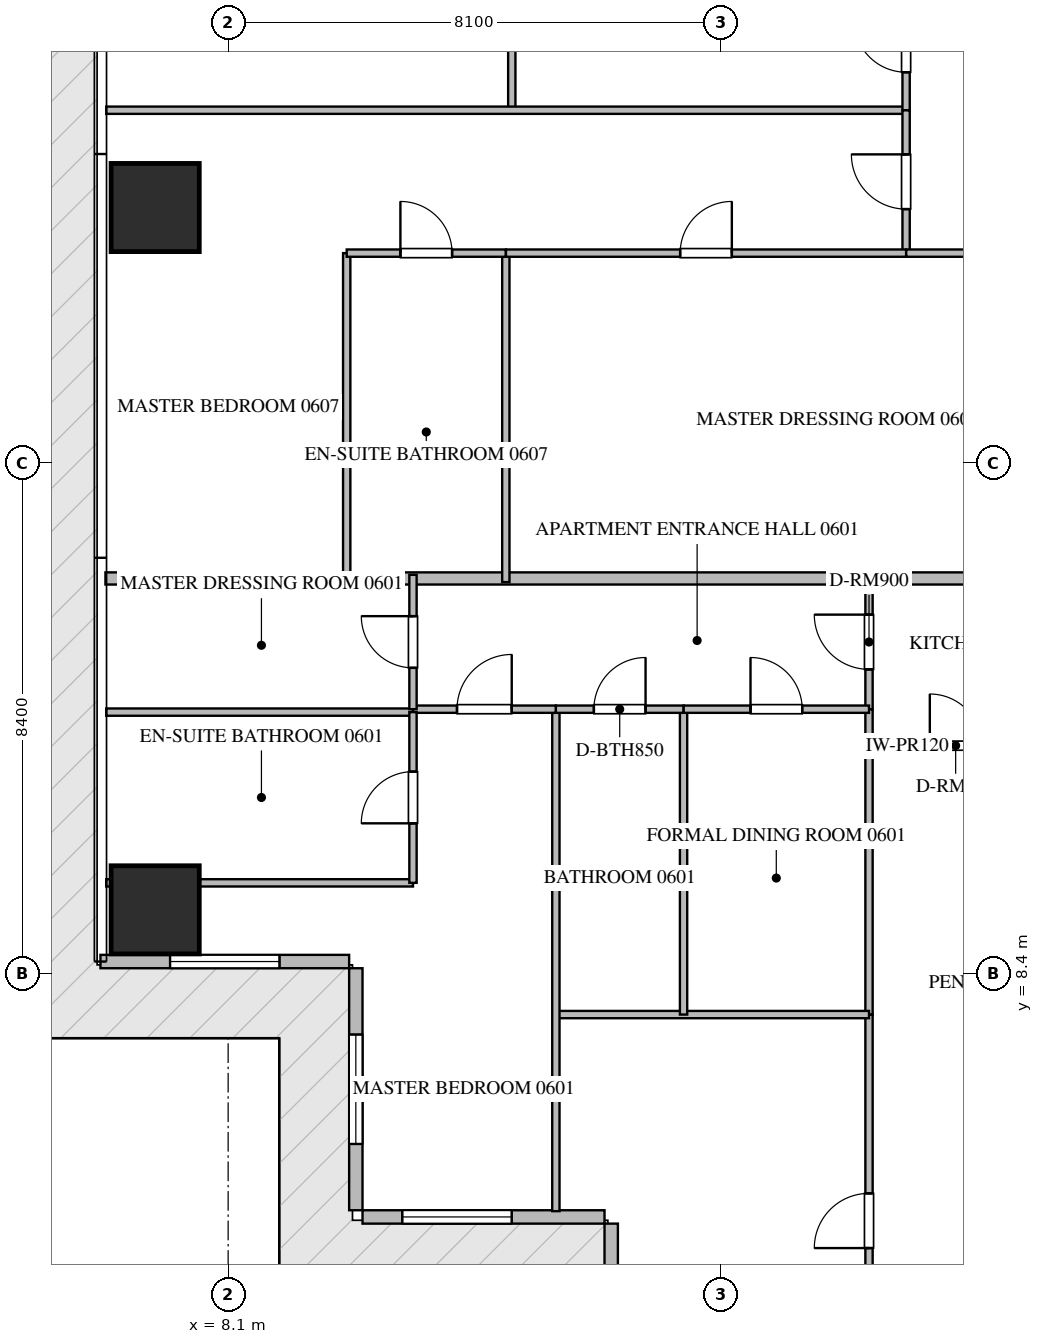
"""IFC4 building model, lengths in metres.
Left out: names, types, materials, properties, quantities, classifications, styles, units other than length and angle.
Written with IfcOpenShell. Run it as: python <this file> out.ifc"""

import sys

from ifc_helpers import new_model, si_unit, direction, frame, frame_2d, origin, origin_2d, place, context, subcontext, project, spatial, rectangle, extrude, source, transform, mapped, element, fill, save


model = new_model("IFC4")
c1 = context("Model", 3, precision=1e-05, world=origin(), true_north=direction((0.0, 1.0)))
c2 = subcontext(c1, "Body", "Model", "MODEL_VIEW")
j1 = project(units=[si_unit("LENGTHUNIT", "METRE"), si_unit("PLANEANGLEUNIT", "RADIAN")], contexts=[c1])
p1 = place(None, origin())
s1 = spatial("IfcSite", under=j1, at=p1, CompositionType="ELEMENT")
p2 = place(p1, origin())
s2 = spatial("IfcBuilding", under=s1, at=p2, CompositionType="ELEMENT")
p3 = place(p2, frame((0.0, 0.0, 30.45)))
s3 = spatial("IfcBuildingStorey", under=s2, at=p3, CompositionType="ELEMENT", Elevation=30.45)
m1 = source(origin(), c2, "Body", "SweptSolid", [
    extrude(rectangle(XDim=1.45, YDim=1.45, at=origin_2d()), origin(), (0.0, 0.0, 1.0), 3.75),
])
for number, where, z_axis, x_axis in (
    (1, (6.9, 9.45, -0.26), (0.0, 0.0, 1.0), (1.0, 0.0, 0.0)),
    (2, (6.9, 21.0, -0.26), (0.0, 0.0, 1.0), (1.0, 0.0, 0.0)),
):
    element("IfcColumn", number, at=place(p3, frame(where, z_axis=z_axis, x_axis=x_axis)), inside=s3, PredefinedType="COLUMN", context=c2, shape_type="MappedRepresentation", body=[
        mapped(m1, transform((0.0, 0.0, 0.0), scale=1.0)),
    ])
p4 = place(p3, frame((6.0, 8.6, 0.0), z_axis=(0.0, 0.0, 1.0), x_axis=(1.0, 0.0, 0.0)))
e3 = element("IfcWall", 3, at=p4, inside=s3, PredefinedType="ELEMENTEDWALL", context=c2, shape_type="SweptSolid", body=[
    extrude(rectangle(XDim=4.09, YDim=0.22, at=frame_2d((2.045, 0.0))), origin(), (0.0, 0.0, 1.0), 3.475),
])
p5 = place(p4, frame((1.145, 0.0, 0.65)))
e4 = element("IfcOpeningElement", 4, at=p5, cuts=e3, PredefinedType="OPENING", context=c2, shape_type="SweptSolid", body=[
    extrude(rectangle(XDim=1.8, YDim=2.1, at=frame_2d((0.9, 1.05))), frame((0.0, 0.12, 0.0), z_axis=(0.0, -1.0, 0.0), x_axis=(1.0, 0.0, 0.0)), (0.0, 0.0, 1.0), 0.24),
])
p6 = place(p3, frame((10.2, 8.49, 0.0), z_axis=(0.0, 0.0, 1.0), x_axis=(0.0, -1.0, 0.0)))
e5 = element("IfcWall", 5, at=p6, inside=s3, PredefinedType="ELEMENTEDWALL", context=c2, shape_type="SweptSolid", body=[
    extrude(rectangle(XDim=3.98, YDim=0.22, at=frame_2d((1.99, 0.0))), origin(), (0.0, 0.0, 1.0), 3.475),
])
p7 = place(p6, frame((1.09, 0.0, 0.65)))
e6 = element("IfcOpeningElement", 6, at=p7, cuts=e5, PredefinedType="OPENING", context=c2, shape_type="SweptSolid", body=[
    extrude(rectangle(XDim=1.8, YDim=2.1, at=frame_2d((0.9, 1.05))), frame((0.0, 0.12, 0.0), z_axis=(0.0, -1.0, 0.0), x_axis=(1.0, 0.0, 0.0)), (0.0, 0.0, 1.0), 0.24),
])
p8 = place(p3, frame((10.31, 4.4, 0.0), z_axis=(0.0, 0.0, 1.0), x_axis=(1.0, 0.0, 0.0)))
e7 = element("IfcWall", 7, at=p8, inside=s3, PredefinedType="ELEMENTEDWALL", context=c2, shape_type="SweptSolid", body=[
    extrude(rectangle(XDim=3.98, YDim=0.22, at=frame_2d((1.99, 0.0))), origin(), (0.0, 0.0, 1.0), 3.475),
])
p9 = place(p8, frame((0.654, 0.0, 0.65)))
e8 = element("IfcOpeningElement", 8, at=p9, cuts=e7, PredefinedType="OPENING", context=c2, shape_type="SweptSolid", body=[
    extrude(rectangle(XDim=1.8, YDim=2.1, at=frame_2d((0.9, 1.05))), frame((0.0, 0.12, 0.0), z_axis=(0.0, -1.0, 0.0), x_axis=(1.0, 0.0, 0.0)), (0.0, 0.0, 1.0), 0.24),
])
p10 = place(p3, frame((14.4, 4.29, 0.0), z_axis=(0.0, 0.0, 1.0), x_axis=(0.0, -1.0, 0.0)))
e9 = element("IfcWall", 9, at=p10, inside=s3, PredefinedType="ELEMENTEDWALL", context=c2, shape_type="SweptSolid", body=[
    extrude(rectangle(XDim=4.09, YDim=0.22, at=frame_2d((2.045, 0.0))), origin(), (0.0, 0.0, 1.0), 3.475),
])
p11 = place(p10, frame((1.145, 0.0, 0.65)))
e10 = element("IfcOpeningElement", 10, at=p11, cuts=e9, PredefinedType="OPENING", context=c2, shape_type="SweptSolid", body=[
    extrude(rectangle(XDim=1.8, YDim=2.1, at=frame_2d((0.9, 1.05))), frame((0.0, 0.12, 0.0), z_axis=(0.0, -1.0, 0.0), x_axis=(1.0, 0.0, 0.0)), (0.0, 0.0, 1.0), 0.24),
])
p12 = place(p3, frame((6.082, 14.9, 0.0), z_axis=(0.0, 0.0, 1.0), x_axis=(1.0, 0.0, 0.0)))
e11 = element("IfcWall", 11, at=p12, inside=s3, PredefinedType="PARTITIONING", context=c2, shape_type="SweptSolid", body=[
    extrude(rectangle(XDim=15.318, YDim=0.2, at=frame_2d((7.659, 0.0))), origin(), (0.0, 0.0, 1.0), 3.49),
])
p13 = place(p3, frame((18.64, 12.15, 0.0), z_axis=(0.0, 0.0, 1.0), x_axis=(1.0, 0.0, 0.0)))
e12 = element("IfcWall", 12, at=p13, inside=s3, PredefinedType="PARTITIONING", context=c2, shape_type="SweptSolid", body=[
    extrude(rectangle(XDim=2.85, YDim=0.12, at=frame_2d((1.425, 0.0))), origin(), (0.0, 0.0, 1.0), 3.49),
])
p14 = place(p13, frame((1.0, 0.0, 0.0)))
e13 = element("IfcOpeningElement", 13, at=p14, cuts=e12, PredefinedType="OPENING", context=c2, shape_type="SweptSolid", body=[
    extrude(rectangle(XDim=0.85, YDim=2.1, at=frame_2d((0.425, 1.05))), frame((0.0, 0.07, 0.0), z_axis=(0.0, -1.0, 0.0), x_axis=(1.0, 0.0, 0.0)), (0.0, 0.0, 1.0), 0.14),
])
p15 = place(p3, frame((18.64, 12.75, 0.0), z_axis=(0.0, 0.0, 1.0), x_axis=(0.0, 1.0, 0.0)))
e14 = element("IfcWall", 14, at=p15, inside=s3, PredefinedType="PARTITIONING", context=c2, shape_type="SweptSolid", body=[
    extrude(rectangle(XDim=2.21, YDim=0.12, at=frame_2d((1.105, 0.0))), origin(), (0.0, 0.0, 1.0), 3.49),
])
p16 = place(p15, frame((0.655, 0.0, 0.0)))
e15 = element("IfcOpeningElement", 15, at=p16, cuts=e14, PredefinedType="OPENING", context=c2, shape_type="SweptSolid", body=[
    extrude(rectangle(XDim=0.9, YDim=2.1, at=frame_2d((0.45, 1.05))), frame((0.0, 0.07, 0.0), z_axis=(0.0, -1.0, 0.0), x_axis=(1.0, 0.0, 0.0)), (0.0, 0.0, 1.0), 0.14),
])
p17 = place(p3, frame((18.64, 0.295, 0.0), z_axis=(0.0, 0.0, 1.0), x_axis=(0.0, 1.0, 0.0)))
e16 = element("IfcWall", 16, at=p17, inside=s3, PredefinedType="PARTITIONING", context=c2, shape_type="SweptSolid", body=[
    extrude(rectangle(XDim=7.433, YDim=0.12, at=frame_2d((3.717, 0.0))), origin(), (0.0, 0.0, 1.0), 3.49),
])
p18 = place(p17, frame((3.593, 0.0, 0.0)))
e17 = element("IfcOpeningElement", 17, at=p18, cuts=e16, PredefinedType="OPENING", context=c2, shape_type="SweptSolid", body=[
    extrude(rectangle(XDim=0.9, YDim=2.1, at=frame_2d((0.45, 1.05))), frame((0.0, 0.07, 0.0), z_axis=(0.0, -1.0, 0.0), x_axis=(1.0, 0.0, 0.0)), (0.0, 0.0, 1.0), 0.14),
])
p19 = place(p3, frame((18.64, 7.73, 0.0), z_axis=(0.0, 0.0, 1.0), x_axis=(0.0, 1.0, 0.0)))
e18 = element("IfcWall", 18, at=p19, inside=s3, PredefinedType="PARTITIONING", context=c2, shape_type="SweptSolid", body=[
    extrude(rectangle(XDim=5.018, YDim=0.12, at=frame_2d((2.509, 0.0))), origin(), (0.0, 0.0, 1.0), 3.49),
])
p20 = place(p3, frame((13.49, 7.728, 0.0), z_axis=(0.0, 0.0, 1.0), x_axis=(1.0, 0.0, 0.0)))
e19 = element("IfcWall", 19, at=p20, inside=s3, PredefinedType="PARTITIONING", context=c2, shape_type="SweptSolid", body=[
    extrude(rectangle(XDim=5.15, YDim=0.12, at=frame_2d((2.575, 0.0))), origin(), (0.0, 0.0, 1.0), 3.49),
])
p21 = place(p3, frame((13.49, 4.495, 0.0), z_axis=(0.0, 0.0, 1.0), x_axis=(0.0, 1.0, 0.0)))
e20 = element("IfcWall", 20, at=p21, inside=s3, PredefinedType="PARTITIONING", context=c2, shape_type="SweptSolid", body=[
    extrude(rectangle(XDim=8.255, YDim=0.12, at=frame_2d((4.127, 0.0))), origin(), (0.0, 0.0, 1.0), 3.49),
])
p22 = place(p3, frame((15.59, 7.728, 0.0), z_axis=(0.0, 0.0, 1.0), x_axis=(0.0, 1.0, 0.0)))
e21 = element("IfcWall", 21, at=p22, inside=s3, PredefinedType="PARTITIONING", context=c2, shape_type="SweptSolid", body=[
    extrude(rectangle(XDim=5.022, YDim=0.12, at=frame_2d((2.511, 0.0))), origin(), (0.0, 0.0, 1.0), 3.49),
])
p23 = place(p3, frame((13.49, 12.75, 0.0), z_axis=(0.0, 0.0, 1.0), x_axis=(1.0, 0.0, 0.0)))
e22 = element("IfcWall", 22, at=p23, inside=s3, PredefinedType="PARTITIONING", context=c2, shape_type="SweptSolid", body=[
    extrude(rectangle(XDim=2.1, YDim=0.12, at=frame_2d((1.05, 0.0))), origin(), (0.0, 0.0, 1.0), 3.49),
])
p24 = place(p23, frame((0.625, 0.0, 0.0)))
e23 = element("IfcOpeningElement", 23, at=p24, cuts=e22, PredefinedType="OPENING", context=c2, shape_type="SweptSolid", body=[
    extrude(rectangle(XDim=0.85, YDim=2.1, at=frame_2d((0.425, 1.05))), frame((0.0, 0.07, 0.0), z_axis=(0.0, -1.0, 0.0), x_axis=(1.0, 0.0, 0.0)), (0.0, 0.0, 1.0), 0.14),
])
p25 = place(p3, frame((15.592, 12.75, 0.0), z_axis=(0.0, 0.0, 1.0), x_axis=(1.0, 0.0, 0.0)))
e24 = element("IfcWall", 24, at=p25, inside=s3, PredefinedType="PARTITIONING", context=c2, shape_type="SweptSolid", body=[
    extrude(rectangle(XDim=3.048, YDim=0.12, at=frame_2d((1.524, 0.0))), origin(), (0.0, 0.0, 1.0), 3.49),
])
p26 = place(p25, frame((1.099, 0.0, 0.0)))
e25 = element("IfcOpeningElement", 25, at=p26, cuts=e24, PredefinedType="OPENING", context=c2, shape_type="SweptSolid", body=[
    extrude(rectangle(XDim=0.85, YDim=2.1, at=frame_2d((0.425, 1.05))), frame((0.0, 0.07, 0.0), z_axis=(0.0, -1.0, 0.0), x_axis=(1.0, 0.0, 0.0)), (0.0, 0.0, 1.0), 0.14),
])
p27 = place(p3, frame((11.14, 12.75, 0.0), z_axis=(0.0, 0.0, 1.0), x_axis=(1.0, 0.0, 0.0)))
e26 = element("IfcWall", 26, at=p27, inside=s3, PredefinedType="PARTITIONING", context=c2, shape_type="SweptSolid", body=[
    extrude(rectangle(XDim=2.348, YDim=0.12, at=frame_2d((1.174, 0.0))), origin(), (0.0, 0.0, 1.0), 3.49),
])
p28 = place(p27, frame((0.724, 0.0, 0.0)))
e27 = element("IfcOpeningElement", 27, at=p28, cuts=e26, PredefinedType="OPENING", context=c2, shape_type="SweptSolid", body=[
    extrude(rectangle(XDim=0.9, YDim=2.1, at=frame_2d((0.45, 1.05))), frame((0.0, 0.07, 0.0), z_axis=(0.0, -1.0, 0.0), x_axis=(1.0, 0.0, 0.0)), (0.0, 0.0, 1.0), 0.14),
])
p29 = place(p3, frame((6.095, 9.894, 0.0), z_axis=(0.0, 0.0, 1.0), x_axis=(1.0, 0.0, 0.0)))
e28 = element("IfcWall", 28, at=p29, inside=s3, PredefinedType="PARTITIONING", context=c2, shape_type="SweptSolid", body=[
    extrude(rectangle(XDim=5.045, YDim=0.12, at=frame_2d((2.522, 0.0))), origin(), (0.0, 0.0, 1.0), 3.49),
])
p30 = place(p3, frame((6.095, 12.702, 0.0), z_axis=(0.0, 0.0, 1.0), x_axis=(1.0, 0.0, 0.0)))
e29 = element("IfcWall", 29, at=p30, inside=s3, PredefinedType="PARTITIONING", context=c2, shape_type="SweptSolid", body=[
    extrude(rectangle(XDim=5.043, YDim=0.12, at=frame_2d((2.521, 0.0))), origin(), (0.0, 0.0, 1.0), 3.49),
])
p31 = place(p3, frame((11.14, 9.894, 0.0), z_axis=(0.0, 0.0, 1.0), x_axis=(0.0, 1.0, 0.0)))
e30 = element("IfcWall", 30, at=p31, inside=s3, PredefinedType="PARTITIONING", context=c2, shape_type="SweptSolid", body=[
    extrude(rectangle(XDim=2.808, YDim=0.12, at=frame_2d((1.404, 0.0))), origin(), (0.0, 0.0, 1.0), 3.49),
])
p32 = place(p31, frame((0.979, 0.0, 0.0)))
e31 = element("IfcOpeningElement", 31, at=p32, cuts=e30, PredefinedType="OPENING", context=c2, shape_type="SweptSolid", body=[
    extrude(rectangle(XDim=0.85, YDim=2.1, at=frame_2d((0.425, 1.05))), frame((0.0, 0.07, 0.0), z_axis=(0.0, -1.0, 0.0), x_axis=(1.0, 0.0, 0.0)), (0.0, 0.0, 1.0), 0.14),
])
p33 = place(p3, frame((11.14, 12.75, 0.0), z_axis=(0.0, 0.0, 1.0), x_axis=(0.0, 1.0, 0.0)))
e32 = element("IfcWall", 32, at=p33, inside=s3, PredefinedType="PARTITIONING", context=c2, shape_type="SweptSolid", body=[
    extrude(rectangle(XDim=2.21, YDim=0.12, at=frame_2d((1.105, 0.0))), origin(), (0.0, 0.0, 1.0), 3.49),
])
p34 = place(p33, frame((0.68, 0.0, 0.0)))
e33 = element("IfcOpeningElement", 33, at=p34, cuts=e32, PredefinedType="OPENING", context=c2, shape_type="SweptSolid", body=[
    extrude(rectangle(XDim=0.85, YDim=2.1, at=frame_2d((0.425, 1.05))), frame((0.0, 0.07, 0.0), z_axis=(0.0, -1.0, 0.0), x_axis=(1.0, 0.0, 0.0)), (0.0, 0.0, 1.0), 0.14),
])
p35 = place(p3, frame((12.765, 22.6, 0.0), z_axis=(0.0, 0.0, 1.0), x_axis=(0.0, 1.0, 0.0)))
e34 = element("IfcWall", 34, at=p35, inside=s3, PredefinedType="PARTITIONING", context=c2, shape_type="SweptSolid", body=[
    extrude(rectangle(XDim=5.07, YDim=0.12, at=frame_2d((2.535, 0.0))), origin(), (0.0, 0.0, 1.0), 3.49),
])
p36 = place(p3, frame((6.095, 22.6, 0.0), z_axis=(0.0, 0.0, 1.0), x_axis=(1.0, 0.0, 0.0)))
e35 = element("IfcWall", 35, at=p36, inside=s3, PredefinedType="PARTITIONING", context=c2, shape_type="SweptSolid", body=[
    extrude(rectangle(XDim=13.155, YDim=0.12, at=frame_2d((6.578, 0.0))), origin(), (0.0, 0.0, 1.0), 3.49),
])
p37 = place(p3, frame((19.25, 22.6, 0.0), z_axis=(0.0, 0.0, 1.0), x_axis=(0.0, 1.0, 0.0)))
e36 = element("IfcWall", 36, at=p37, inside=s3, PredefinedType="PARTITIONING", context=c2, shape_type="SweptSolid", body=[
    extrude(rectangle(XDim=2.1, YDim=0.12, at=frame_2d((1.05, 0.0))), origin(), (0.0, 0.0, 1.0), 3.49),
])
p38 = place(p37, frame((0.625, 0.0, 0.0)))
e37 = element("IfcOpeningElement", 37, at=p38, cuts=e36, PredefinedType="OPENING", context=c2, shape_type="SweptSolid", body=[
    extrude(rectangle(XDim=0.85, YDim=2.1, at=frame_2d((0.425, 1.05))), frame((0.0, 0.07, 0.0), z_axis=(0.0, -1.0, 0.0), x_axis=(1.0, 0.0, 0.0)), (0.0, 0.0, 1.0), 0.14),
])
p39 = place(p3, frame((19.25, 20.25, 0.0), z_axis=(0.0, 0.0, 1.0), x_axis=(0.0, 1.0, 0.0)))
e38 = element("IfcWall", 38, at=p39, inside=s3, PredefinedType="PARTITIONING", context=c2, shape_type="SweptSolid", body=[
    extrude(rectangle(XDim=2.348, YDim=0.12, at=frame_2d((1.174, 0.0))), origin(), (0.0, 0.0, 1.0), 3.49),
])
p40 = place(p39, frame((0.724, 0.0, 0.0)))
e39 = element("IfcOpeningElement", 39, at=p40, cuts=e38, PredefinedType="OPENING", context=c2, shape_type="SweptSolid", body=[
    extrude(rectangle(XDim=0.9, YDim=2.1, at=frame_2d((0.45, 1.05))), frame((0.0, 0.07, 0.0), z_axis=(0.0, -1.0, 0.0), x_axis=(1.0, 0.0, 0.0)), (0.0, 0.0, 1.0), 0.14),
])
for number, where, z_axis, x_axis in (
    (40, (10.05, 14.84, 0.0), (0.0, 0.0, 1.0), (0.0, 1.0, 0.0)),
    (41, (12.667, 14.84, 0.0), (0.0, 0.0, 1.0), (0.0, 1.0, 0.0)),
):
    element("IfcWall", number, at=place(p3, frame(where, z_axis=z_axis, x_axis=x_axis)), inside=s3, PredefinedType="PARTITIONING", context=c2, shape_type="SweptSolid", body=[
        extrude(rectangle(XDim=5.41, YDim=0.12, at=frame_2d((2.705, 0.0))), origin(), (0.0, 0.0, 1.0), 3.49),
    ])
p41 = place(p3, frame((10.05, 20.25, 0.0), z_axis=(0.0, 0.0, 1.0), x_axis=(1.0, 0.0, 0.0)))
e42 = element("IfcWall", 42, at=p41, inside=s3, PredefinedType="PARTITIONING", context=c2, shape_type="SweptSolid", body=[
    extrude(rectangle(XDim=2.617, YDim=0.12, at=frame_2d((1.309, 0.0))), origin(), (0.0, 0.0, 1.0), 3.49),
])
p42 = place(p41, frame((0.883, 0.0, 0.0)))
e43 = element("IfcOpeningElement", 43, at=p42, cuts=e42, PredefinedType="OPENING", context=c2, shape_type="SweptSolid", body=[
    extrude(rectangle(XDim=0.85, YDim=2.1, at=frame_2d((0.425, 1.05))), frame((0.0, 0.07, 0.0), z_axis=(0.0, -1.0, 0.0), x_axis=(1.0, 0.0, 0.0)), (0.0, 0.0, 1.0), 0.14),
])
p43 = place(p3, frame((12.669, 20.25, 0.0), z_axis=(0.0, 0.0, 1.0), x_axis=(1.0, 0.0, 0.0)))
e44 = element("IfcWall", 44, at=p43, inside=s3, PredefinedType="PARTITIONING", context=c2, shape_type="SweptSolid", body=[
    extrude(rectangle(XDim=6.581, YDim=0.12, at=frame_2d((3.291, 0.0))), origin(), (0.0, 0.0, 1.0), 3.49),
])
p44 = place(p43, frame((2.865, 0.0, 0.0)))
e45 = element("IfcOpeningElement", 45, at=p44, cuts=e44, PredefinedType="OPENING", context=c2, shape_type="SweptSolid", body=[
    extrude(rectangle(XDim=0.85, YDim=2.1, at=frame_2d((0.425, 1.05))), frame((0.0, 0.07, 0.0), z_axis=(0.0, -1.0, 0.0), x_axis=(1.0, 0.0, 0.0)), (0.0, 0.0, 1.0), 0.14),
])
p45 = place(p3, frame((19.252, 20.25, 0.0), z_axis=(0.0, 0.0, 1.0), x_axis=(1.0, 0.0, 0.0)))
e46 = element("IfcWall", 46, at=p45, inside=s3, PredefinedType="PARTITIONING", context=c2, shape_type="SweptSolid", body=[
    extrude(rectangle(XDim=2.208, YDim=0.12, at=frame_2d((1.104, 0.0))), origin(), (0.0, 0.0, 1.0), 3.49),
])
m2 = source(origin(), c2, "Body", "SweptSolid", [
    extrude(rectangle(XDim=1.8, YDim=2.1, at=frame_2d((0.9, 1.05))), frame((0.0, 0.03, 0.0), z_axis=(0.0, -1.0, 0.0), x_axis=(1.0, 0.0, 0.0)), (0.0, 0.0, 1.0), 0.06),
])
p46 = place(p5, origin())
e47 = element("IfcWindow", 47, at=p46, inside=s3, PartitioningType="SINGLE_PANEL", PredefinedType="WINDOW", context=c2, shape_type="MappedRepresentation", body=[
    mapped(m2, transform((0.0, 0.0, 0.0), scale=1.0)),
])
fill(e4, e47)
p47 = place(p7, origin())
e48 = element("IfcWindow", 48, at=p47, inside=s3, PartitioningType="SINGLE_PANEL", PredefinedType="WINDOW", context=c2, shape_type="MappedRepresentation", body=[
    mapped(m2, transform((0.0, 0.0, 0.0), scale=1.0)),
])
fill(e6, e48)
p48 = place(p9, origin())
e49 = element("IfcWindow", 49, at=p48, inside=s3, PartitioningType="SINGLE_PANEL", PredefinedType="WINDOW", context=c2, shape_type="MappedRepresentation", body=[
    mapped(m2, transform((0.0, 0.0, 0.0), scale=1.0)),
])
fill(e8, e49)
m3 = source(origin(), c2, "Body", "SweptSolid", [
    extrude(rectangle(XDim=0.85, YDim=2.1, at=frame_2d((0.425, 1.05))), frame((0.0, 0.025, 0.0), z_axis=(0.0, -1.0, 0.0), x_axis=(1.0, 0.0, 0.0)), (0.0, 0.0, 1.0), 0.05),
])
p49 = place(p14, origin())
e50 = element("IfcDoor", 50, at=p49, inside=s3, OperationType="SINGLE_SWING_LEFT", PredefinedType="DOOR", context=c2, shape_type="MappedRepresentation", body=[
    mapped(m3, transform((0.0, 0.0, 0.0), scale=1.0)),
])
fill(e13, e50)
m4 = source(origin(), c2, "Body", "SweptSolid", [
    extrude(rectangle(XDim=0.9, YDim=2.1, at=frame_2d((0.45, 1.05))), frame((0.0, 0.025, 0.0), z_axis=(0.0, -1.0, 0.0), x_axis=(1.0, 0.0, 0.0)), (0.0, 0.0, 1.0), 0.05),
])
p50 = place(p16, origin())
e51 = element("IfcDoor", 51, at=p50, inside=s3, OperationType="SINGLE_SWING_RIGHT", PredefinedType="DOOR", context=c2, shape_type="MappedRepresentation", body=[
    mapped(m4, transform((0.0, 0.0, 0.0), scale=1.0)),
])
fill(e15, e51)
p51 = place(p18, origin())
e52 = element("IfcDoor", 52, at=p51, inside=s3, OperationType="SINGLE_SWING_LEFT", PredefinedType="DOOR", context=c2, shape_type="MappedRepresentation", body=[
    mapped(m4, transform((0.0, 0.0, 0.0), scale=1.0)),
])
fill(e17, e52)
p52 = place(p24, origin())
e53 = element("IfcDoor", 53, at=p52, inside=s3, OperationType="SINGLE_SWING_RIGHT", PredefinedType="DOOR", context=c2, shape_type="MappedRepresentation", body=[
    mapped(m3, transform((0.0, 0.0, 0.0), scale=1.0)),
])
fill(e23, e53)
p53 = place(p26, origin())
e54 = element("IfcDoor", 54, at=p53, inside=s3, OperationType="SINGLE_SWING_LEFT", PredefinedType="DOOR", context=c2, shape_type="MappedRepresentation", body=[
    mapped(m3, transform((0.0, 0.0, 0.0), scale=1.0)),
])
fill(e25, e54)
p54 = place(p28, origin())
e55 = element("IfcDoor", 55, at=p54, inside=s3, OperationType="SINGLE_SWING_RIGHT", PredefinedType="DOOR", context=c2, shape_type="MappedRepresentation", body=[
    mapped(m4, transform((0.0, 0.0, 0.0), scale=1.0)),
])
fill(e27, e55)
p55 = place(p32, origin())
e56 = element("IfcDoor", 56, at=p55, inside=s3, OperationType="SINGLE_SWING_LEFT", PredefinedType="DOOR", context=c2, shape_type="MappedRepresentation", body=[
    mapped(m3, transform((0.0, 0.0, 0.0), scale=1.0)),
])
fill(e31, e56)
p56 = place(p34, origin())
e57 = element("IfcDoor", 57, at=p56, inside=s3, OperationType="SINGLE_SWING_RIGHT", PredefinedType="DOOR", context=c2, shape_type="MappedRepresentation", body=[
    mapped(m3, transform((0.0, 0.0, 0.0), scale=1.0)),
])
fill(e33, e57)
p57 = place(p38, origin())
e58 = element("IfcDoor", 58, at=p57, inside=s3, OperationType="SINGLE_SWING_RIGHT", PredefinedType="DOOR", context=c2, shape_type="MappedRepresentation", body=[
    mapped(m3, transform((0.0, 0.0, 0.0), scale=1.0)),
])
fill(e37, e58)
p58 = place(p40, origin())
e59 = element("IfcDoor", 59, at=p58, inside=s3, OperationType="SINGLE_SWING_RIGHT", PredefinedType="DOOR", context=c2, shape_type="MappedRepresentation", body=[
    mapped(m4, transform((0.0, 0.0, 0.0), scale=1.0)),
])
fill(e39, e59)
p59 = place(p42, origin())
e60 = element("IfcDoor", 60, at=p59, inside=s3, OperationType="SINGLE_SWING_LEFT", PredefinedType="DOOR", context=c2, shape_type="MappedRepresentation", body=[
    mapped(m3, transform((0.0, 0.0, 0.0), scale=1.0)),
])
fill(e43, e60)
p60 = place(p44, origin())
e61 = element("IfcDoor", 61, at=p60, inside=s3, OperationType="SINGLE_SWING_RIGHT", PredefinedType="DOOR", context=c2, shape_type="MappedRepresentation", body=[
    mapped(m3, transform((0.0, 0.0, 0.0), scale=1.0)),
])
fill(e45, e61)
save(model, sys.argv[1])
